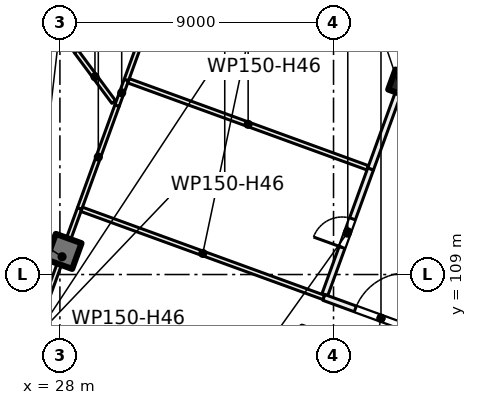
"""IFC4 building model, lengths in metres.
Left out: names, types, materials, properties, quantities, classifications, styles, units other than length and angle.
Written with IfcOpenShell. Run it as: python <this file> out.ifc"""

import sys

from ifc_helpers import new_model, si_unit, direction, frame, frame_2d, origin, origin_2d, place, context, subcontext, project, spatial, rectangle, extrude, element, fill, save


model = new_model("IFC4")
c1 = context("Model", 3, precision=1e-05, world=origin(), true_north=direction((0.0, 1.0)))
c2 = subcontext(c1, "Body", "Model", "MODEL_VIEW")
j1 = project(units=[si_unit("LENGTHUNIT", "METRE"), si_unit("PLANEANGLEUNIT", "RADIAN")], contexts=[c1])
p1 = place(None, origin())
s1 = spatial("IfcSite", under=j1, at=p1, CompositionType="ELEMENT")
p2 = place(p1, origin())
s2 = spatial("IfcBuilding", under=s1, at=p2, CompositionType="ELEMENT")
p3 = place(p2, frame((0.0, 0.0, 7.5)))
s3 = spatial("IfcBuildingStorey", under=s2, at=p3, CompositionType="ELEMENT", Elevation=7.5)
p4 = place(p3, frame((39.247, 115.293, 0.0), z_axis=(0.0, 0.0, 1.0), x_axis=(-0.342020143326, -0.939692620786, 0.0)))
e1 = element("IfcColumn", 1, at=p4, inside=s3, PredefinedType="COLUMN", context=c2, shape_type="SweptSolid", body=[
    extrude(rectangle(XDim=0.7, YDim=0.7, at=origin_2d()), origin(), (0.0, 0.0, 1.0), 5.0),
])
p5 = place(p3, frame((28.134, 109.76, 0.0), z_axis=(0.0, 0.0, 1.0), x_axis=(-0.342020143326, -0.939692620786, 0.0)))
e2 = element("IfcColumn", 2, at=p5, inside=s3, PredefinedType="COLUMN", context=c2, shape_type="SweptSolid", body=[
    extrude(rectangle(XDim=0.9, YDim=0.9, at=origin_2d()), origin(), (0.0, 0.0, 1.0), 5.0),
])
p6 = place(p3, frame((12.199, 89.809, 0.0), z_axis=(0.0, 0.0, 1.0), x_axis=(0.342022998908, 0.939691581434, 0.0)))
e3 = element("IfcWall", 3, at=p6, inside=s3, PredefinedType="SOLIDWALL", context=c2, shape_type="SweptSolid", body=[
    extrude(rectangle(XDim=47.334, YDim=0.6, at=frame_2d((23.667, 0.0))), origin(), (0.0, 0.0, 1.0), 4.6),
])
p7 = place(p6, frame((0.773, 0.0, 0.9)))
e4 = element("IfcOpeningElement", 4, at=p7, cuts=e3, PredefinedType="OPENING", context=c2, shape_type="SweptSolid", body=[
    extrude(rectangle(XDim=3.0, YDim=3.0, at=frame_2d((1.5, 1.5))), frame((0.0, 0.31, 0.0), z_axis=(0.0, -1.0, 0.0), x_axis=(1.0, 0.0, 0.0)), (0.0, 0.0, 1.0), 0.62),
])
p8 = place(p6, frame((5.379, 0.0, 0.9)))
e5 = element("IfcOpeningElement", 5, at=p8, cuts=e3, PredefinedType="OPENING", context=c2, shape_type="SweptSolid", body=[
    extrude(rectangle(XDim=3.0, YDim=3.0, at=frame_2d((1.5, 1.5))), frame((0.0, 0.31, 0.0), z_axis=(0.0, -1.0, 0.0), x_axis=(1.0, 0.0, 0.0)), (0.0, 0.0, 1.0), 0.62),
])
p9 = place(p6, frame((9.235, 0.0, 0.9)))
e6 = element("IfcOpeningElement", 6, at=p9, cuts=e3, PredefinedType="OPENING", context=c2, shape_type="SweptSolid", body=[
    extrude(rectangle(XDim=3.0, YDim=3.0, at=frame_2d((1.5, 1.5))), frame((0.0, 0.31, 0.0), z_axis=(0.0, -1.0, 0.0), x_axis=(1.0, 0.0, 0.0)), (0.0, 0.0, 1.0), 0.62),
])
p10 = place(p6, frame((14.786, 0.0, 0.9)))
e7 = element("IfcOpeningElement", 7, at=p10, cuts=e3, PredefinedType="OPENING", context=c2, shape_type="SweptSolid", body=[
    extrude(rectangle(XDim=1.2, YDim=3.0, at=frame_2d((0.6, 1.5))), frame((0.0, 0.31, 0.0), z_axis=(0.0, -1.0, 0.0), x_axis=(1.0, 0.0, 0.0)), (0.0, 0.0, 1.0), 0.62),
])
p11 = place(p6, frame((16.286, 0.0, 0.9)))
e8 = element("IfcOpeningElement", 8, at=p11, cuts=e3, PredefinedType="OPENING", context=c2, shape_type="SweptSolid", body=[
    extrude(rectangle(XDim=1.2, YDim=3.0, at=frame_2d((0.6, 1.5))), frame((0.0, 0.31, 0.0), z_axis=(0.0, -1.0, 0.0), x_axis=(1.0, 0.0, 0.0)), (0.0, 0.0, 1.0), 0.62),
])
p12 = place(p6, frame((18.118, 0.0, 0.9)))
e9 = element("IfcOpeningElement", 9, at=p12, cuts=e3, PredefinedType="OPENING", context=c2, shape_type="SweptSolid", body=[
    extrude(rectangle(XDim=1.2, YDim=3.0, at=frame_2d((0.6, 1.5))), frame((0.0, 0.31, 0.0), z_axis=(0.0, -1.0, 0.0), x_axis=(1.0, 0.0, 0.0)), (0.0, 0.0, 1.0), 0.62),
])
p13 = place(p6, frame((19.618, 0.0, 0.9)))
e10 = element("IfcOpeningElement", 10, at=p13, cuts=e3, PredefinedType="OPENING", context=c2, shape_type="SweptSolid", body=[
    extrude(rectangle(XDim=1.2, YDim=3.0, at=frame_2d((0.6, 1.5))), frame((0.0, 0.31, 0.0), z_axis=(0.0, -1.0, 0.0), x_axis=(1.0, 0.0, 0.0)), (0.0, 0.0, 1.0), 0.62),
])
p14 = place(p6, frame((22.452, 0.0, 0.9)))
e11 = element("IfcOpeningElement", 11, at=p14, cuts=e3, PredefinedType="OPENING", context=c2, shape_type="SweptSolid", body=[
    extrude(rectangle(XDim=3.0, YDim=3.0, at=frame_2d((1.5, 1.5))), frame((0.0, 0.31, 0.0), z_axis=(0.0, -1.0, 0.0), x_axis=(1.0, 0.0, 0.0)), (0.0, 0.0, 1.0), 0.62),
])
p15 = place(p6, frame((26.458, 0.0, 0.9)))
e12 = element("IfcOpeningElement", 12, at=p15, cuts=e3, PredefinedType="OPENING", context=c2, shape_type="SweptSolid", body=[
    extrude(rectangle(XDim=3.0, YDim=3.0, at=frame_2d((1.5, 1.5))), frame((0.0, 0.31, 0.0), z_axis=(0.0, -1.0, 0.0), x_axis=(1.0, 0.0, 0.0)), (0.0, 0.0, 1.0), 0.62),
])
p16 = place(p6, frame((31.064, 0.0, 0.9)))
e13 = element("IfcOpeningElement", 13, at=p16, cuts=e3, PredefinedType="OPENING", context=c2, shape_type="SweptSolid", body=[
    extrude(rectangle(XDim=3.0, YDim=3.0, at=frame_2d((1.5, 1.5))), frame((0.0, 0.31, 0.0), z_axis=(0.0, -1.0, 0.0), x_axis=(1.0, 0.0, 0.0)), (0.0, 0.0, 1.0), 0.62),
])
p17 = place(p6, frame((36.029, 0.0, 0.9)))
e14 = element("IfcOpeningElement", 14, at=p17, cuts=e3, PredefinedType="OPENING", context=c2, shape_type="SweptSolid", body=[
    extrude(rectangle(XDim=1.2, YDim=3.0, at=frame_2d((0.6, 1.5))), frame((0.0, 0.31, 0.0), z_axis=(0.0, -1.0, 0.0), x_axis=(1.0, 0.0, 0.0)), (0.0, 0.0, 1.0), 0.62),
])
p18 = place(p6, frame((39.676, 0.0, 0.9)))
e15 = element("IfcOpeningElement", 15, at=p18, cuts=e3, PredefinedType="OPENING", context=c2, shape_type="SweptSolid", body=[
    extrude(rectangle(XDim=3.0, YDim=3.0, at=frame_2d((1.5, 1.5))), frame((0.0, 0.31, 0.0), z_axis=(0.0, -1.0, 0.0), x_axis=(1.0, 0.0, 0.0)), (0.0, 0.0, 1.0), 0.62),
])
p19 = place(p6, frame((43.531, 0.0, 0.9)))
e16 = element("IfcOpeningElement", 16, at=p19, cuts=e3, PredefinedType="OPENING", context=c2, shape_type="SweptSolid", body=[
    extrude(rectangle(XDim=3.0, YDim=3.0, at=frame_2d((1.5, 1.5))), frame((0.0, 0.31, 0.0), z_axis=(0.0, -1.0, 0.0), x_axis=(1.0, 0.0, 0.0)), (0.0, 0.0, 1.0), 0.62),
])
p20 = place(p3, frame((27.478, 118.104, 0.0), z_axis=(0.0, 0.0, 1.0), x_axis=(0.514009565734, -0.857784452141, 0.0)))
e17 = element("IfcWall", 17, at=p20, inside=s3, PredefinedType="PARTITIONING", context=c2, shape_type="SweptSolid", body=[
    extrude(rectangle(XDim=2.068, YDim=0.15, at=frame_2d((1.034, 0.0))), origin(), (0.0, 0.0, 1.0), 4.6),
])
p21 = place(p3, frame((27.494, 108.0, 0.0), z_axis=(0.0, 0.0, 1.0), x_axis=(0.341841854689, 0.93975749339, 0.0)))
e18 = element("IfcWall", 18, at=p21, inside=s3, PredefinedType="PARTITIONING", context=c2, shape_type="SweptSolid", body=[
    extrude(rectangle(XDim=3.373, YDim=0.15, at=frame_2d((1.687, 0.0))), origin(), (0.0, 0.0, 1.0), 4.6),
])
p22 = place(p3, frame((28.537, 116.336, 0.0), z_axis=(0.0, 0.0, 1.0), x_axis=(0.595741297031, -0.80317638599, 0.0)))
e19 = element("IfcWall", 19, at=p22, inside=s3, PredefinedType="PARTITIONING", context=c2, shape_type="SweptSolid", body=[
    extrude(rectangle(XDim=2.068, YDim=0.15, at=frame_2d((1.034, 0.0))), origin(), (0.0, 0.0, 1.0), 4.6),
])
p23 = place(p3, frame((28.647, 111.17, 0.0), z_axis=(0.0, 0.0, 1.0), x_axis=(0.341993373756, 0.939702363681, 0.0)))
e20 = element("IfcWall", 20, at=p23, inside=s3, PredefinedType="PARTITIONING", context=c2, shape_type="SweptSolid", body=[
    extrude(rectangle(XDim=3.602, YDim=0.15, at=frame_2d((1.801, 0.0))), origin(), (0.0, 0.0, 1.0), 4.6),
])
p24 = place(p3, frame((28.717, 111.144, 0.0), z_axis=(0.0, 0.0, 1.0), x_axis=(0.939731172492, -0.341914204803, 0.0)))
e21 = element("IfcWall", 21, at=p24, inside=s3, PredefinedType="PARTITIONING", context=c2, shape_type="SweptSolid", body=[
    extrude(rectangle(XDim=8.476, YDim=0.15, at=frame_2d((4.238, 0.0))), origin(), (0.0, 0.0, 1.0), 4.6),
])
p25 = place(p3, frame((29.879, 114.555, 0.0), z_axis=(0.0, 0.0, 1.0), x_axis=(0.341961311006, 0.939714031914, 0.0)))
e22 = element("IfcWall", 22, at=p25, inside=s3, PredefinedType="PARTITIONING", context=c2, shape_type="SweptSolid", body=[
    extrude(rectangle(XDim=0.898, YDim=0.15, at=frame_2d((0.449, 0.0))), origin(), (0.0, 0.0, 1.0), 4.6),
])
p26 = place(p3, frame((30.186, 115.399, 0.0), z_axis=(0.0, 0.0, 1.0), x_axis=(0.342121388632, 0.939655764331, 0.0)))
e23 = element("IfcWall", 23, at=p26, inside=s3, PredefinedType="PARTITIONING", context=c2, shape_type="SweptSolid", body=[
    extrude(rectangle(XDim=13.574, YDim=0.15, at=frame_2d((6.787, 0.0))), origin(), (0.0, 0.0, 1.0), 4.6),
])
p27 = place(p3, frame((30.256, 115.373, 0.0), z_axis=(0.0, 0.0, 1.0), x_axis=(0.939683593483, -0.342044944618, 0.0)))
e24 = element("IfcWall", 24, at=p27, inside=s3, PredefinedType="PARTITIONING", context=c2, shape_type="SweptSolid", body=[
    extrude(rectangle(XDim=8.376, YDim=0.15, at=frame_2d((4.188, 0.0))), origin(), (0.0, 0.0, 1.0), 4.6),
])
p28 = place(p3, frame((36.716, 108.34, 0.0), z_axis=(0.0, 0.0, 1.0), x_axis=(0.342063854115, 0.939676710208, 0.0)))
e25 = element("IfcWall", 25, at=p28, inside=s3, PredefinedType="PARTITIONING", context=c2, shape_type="SweptSolid", body=[
    extrude(rectangle(XDim=4.399, YDim=0.2, at=frame_2d((2.2, 0.0))), origin(), (0.0, 0.0, 1.0), 4.6),
])
p29 = place(p28, frame((1.652, 0.0, 0.0)))
e26 = element("IfcOpeningElement", 26, at=p29, cuts=e25, PredefinedType="OPENING", context=c2, shape_type="SweptSolid", body=[
    extrude(rectangle(XDim=1.0, YDim=2.1, at=frame_2d((0.5, 1.05))), frame((0.0, 0.11, 0.0), z_axis=(0.0, -1.0, 0.0), x_axis=(1.0, 0.0, 0.0)), (0.0, 0.0, 1.0), 0.22),
])
p30 = place(p3, frame((40.44, 106.878, 0.0), z_axis=(0.0, 0.0, 1.0), x_axis=(-0.939665029144, 0.342095941228, 0.0)))
e27 = element("IfcWall", 27, at=p30, inside=s3, PredefinedType="PARTITIONING", context=c2, shape_type="SweptSolid", body=[
    extrude(rectangle(XDim=3.999, YDim=0.2, at=frame_2d((2.0, 0.0))), origin(), (0.0, 0.0, 1.0), 4.6),
])
p31 = place(p30, frame((1.099, 0.0, 0.0)))
e28 = element("IfcOpeningElement", 28, at=p31, cuts=e27, PredefinedType="OPENING", context=c2, shape_type="SweptSolid", body=[
    extrude(rectangle(XDim=1.8, YDim=2.1, at=frame_2d((0.9, 1.05))), frame((0.0, 0.11, 0.0), z_axis=(0.0, -1.0, 0.0), x_axis=(1.0, 0.0, 0.0)), (0.0, 0.0, 1.0), 0.22),
])
p32 = place(p3, frame((38.221, 112.474, 0.0), z_axis=(0.0, 0.0, 1.0), x_axis=(0.342018071111, 0.939693375008, 0.0)))
e29 = element("IfcWall", 29, at=p32, inside=s3, PredefinedType="PARTITIONING", context=c2, shape_type="SweptSolid", body=[
    extrude(rectangle(XDim=13.4, YDim=0.2, at=frame_2d((6.7, 0.0))), origin(), (0.0, 0.0, 1.0), 4.6),
])
p33 = place(p32, frame((6.248, 0.0, 0.0)))
e30 = element("IfcOpeningElement", 30, at=p33, cuts=e29, PredefinedType="OPENING", context=c2, shape_type="SweptSolid", body=[
    extrude(rectangle(XDim=1.0, YDim=2.1, at=frame_2d((0.5, 1.05))), frame((0.0, 0.11, 0.0), z_axis=(0.0, -1.0, 0.0), x_axis=(1.0, 0.0, 0.0)), (0.0, 0.0, 1.0), 0.22),
])
p34 = place(p29, origin())
e31 = element("IfcDoor", 31, at=p34, inside=s3, OperationType="SINGLE_SWING_LEFT", PredefinedType="DOOR", context=c2, shape_type="SweptSolid", body=[
    extrude(rectangle(XDim=1.0, YDim=2.1, at=frame_2d((0.5, 1.05))), frame((0.0, 0.025, 0.0), z_axis=(0.0, -1.0, 0.0), x_axis=(1.0, 0.0, 0.0)), (0.0, 0.0, 1.0), 0.05),
])
fill(e26, e31)
p35 = place(p31, origin())
e32 = element("IfcDoor", 32, at=p35, inside=s3, OperationType="DOUBLE_DOOR_SINGLE_SWING", PredefinedType="DOOR", context=c2, shape_type="SweptSolid", body=[
    extrude(rectangle(XDim=1.8, YDim=2.1, at=frame_2d((0.9, 1.05))), frame((0.0, 0.025, 0.0), z_axis=(0.0, -1.0, 0.0), x_axis=(1.0, 0.0, 0.0)), (0.0, 0.0, 1.0), 0.05),
])
fill(e28, e32)
save(model, sys.argv[1])
